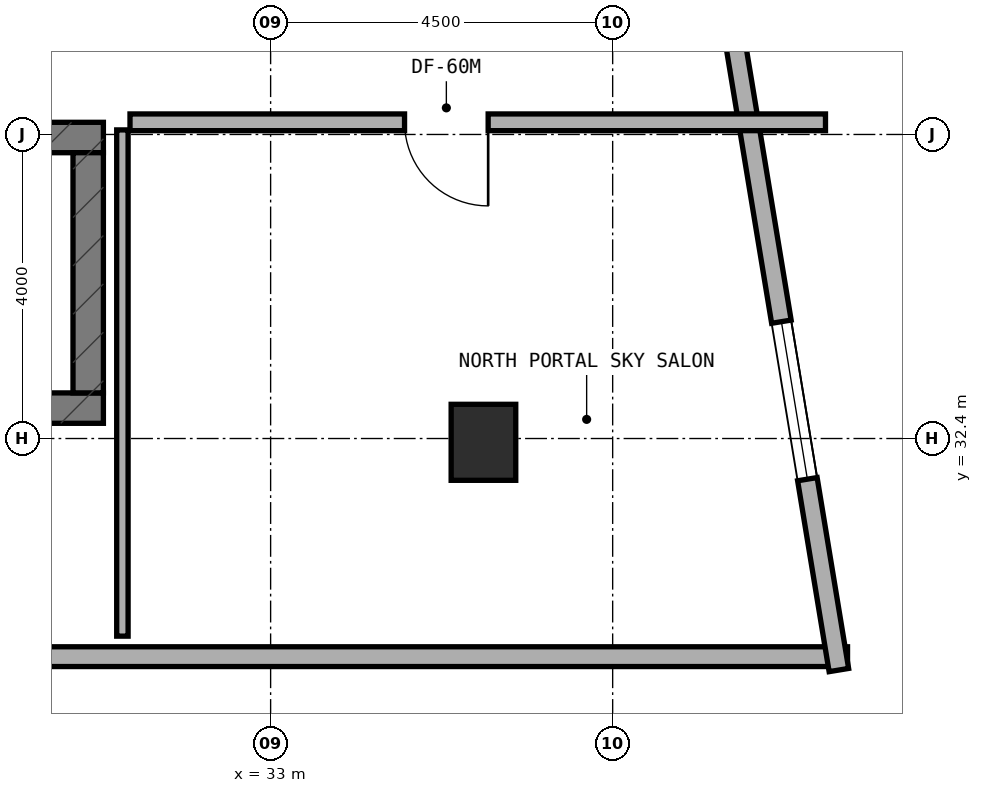
"""IFC4 building model, lengths in metres.
Left out: names, types, materials, properties, quantities, classifications, styles, units other than length and angle.
Written with IfcOpenShell. Run it as: python <this file> out.ifc"""

import sys

from ifc_helpers import new_model, si_unit, direction, frame, frame_2d, origin, origin_2d, place, context, subcontext, project, spatial, rectangle, extrude, element, fill, save


model = new_model("IFC4")
c1 = context("Model", 3, precision=1e-05, world=origin(), true_north=direction((0.0, 1.0)))
c2 = subcontext(c1, "Body", "Model", "MODEL_VIEW")
j1 = project(units=[si_unit("LENGTHUNIT", "METRE"), si_unit("PLANEANGLEUNIT", "RADIAN")], contexts=[c1])
p1 = place(None, origin())
s1 = spatial("IfcSite", under=j1, at=p1, CompositionType="ELEMENT")
p2 = place(p1, origin())
s2 = spatial("IfcBuilding", under=s1, at=p2, CompositionType="ELEMENT")
p3 = place(p2, frame((0.0, 0.0, 195.5)))
s3 = spatial("IfcBuildingStorey", under=s2, at=p3, CompositionType="ELEMENT", Elevation=195.5)
p4 = place(p3, frame((6.4, 32.8, 0.0), z_axis=(0.0, 0.0, 1.0), x_axis=(1.0, 0.0, 0.0)))
e1 = element("IfcWall", 1, at=p4, inside=s3, PredefinedType="SHEAR", context=c2, shape_type="SweptSolid", body=[
    extrude(rectangle(XDim=24.4, YDim=0.4, at=frame_2d((12.2, 0.0))), origin(), (0.0, 0.0, 1.0), 3.6),
])
p5 = place(p4, frame((6.05, 0.0, 0.0)))
e2 = element("IfcOpeningElement", 2, at=p5, cuts=e1, PredefinedType="OPENING", context=c2, shape_type="SweptSolid", body=[
    extrude(rectangle(XDim=1.1, YDim=2.15, at=frame_2d((0.55, 1.075))), frame((0.0, 0.21, 0.0), z_axis=(0.0, -1.0, 0.0), x_axis=(1.0, 0.0, 0.0)), (0.0, 0.0, 1.0), 0.42),
])
p6 = place(p3, frame((6.4, 36.36, 0.0), z_axis=(0.0, 0.0, 1.0), x_axis=(1.0, 0.0, 0.0)))
e3 = element("IfcWall", 3, at=p6, inside=s3, PredefinedType="SHEAR", context=c2, shape_type="SweptSolid", body=[
    extrude(rectangle(XDim=24.4, YDim=0.4, at=frame_2d((12.2, 0.0))), origin(), (0.0, 0.0, 1.0), 3.6),
])
p7 = place(p6, frame((9.15, 0.0, 0.0)))
e4 = element("IfcOpeningElement", 4, at=p7, cuts=e3, PredefinedType="OPENING", context=c2, shape_type="SweptSolid", body=[
    extrude(rectangle(XDim=1.2, YDim=2.15, at=frame_2d((0.6, 1.075))), frame((0.0, 0.21, 0.0), z_axis=(0.0, -1.0, 0.0), x_axis=(1.0, 0.0, 0.0)), (0.0, 0.0, 1.0), 0.42),
])
p8 = place(p6, frame((19.2, 0.0, 0.0)))
e5 = element("IfcOpeningElement", 5, at=p8, cuts=e3, PredefinedType="OPENING", context=c2, shape_type="SweptSolid", body=[
    extrude(rectangle(XDim=0.85, YDim=2.1, at=frame_2d((0.425, 1.05))), frame((0.0, 0.21, 0.0), z_axis=(0.0, -1.0, 0.0), x_axis=(1.0, 0.0, 0.0)), (0.0, 0.0, 1.0), 0.42),
])
p9 = place(p6, frame((16.94, 0.0, 0.0)))
e6 = element("IfcOpeningElement", 6, at=p9, cuts=e3, PredefinedType="OPENING", context=c2, shape_type="SweptSolid", body=[
    extrude(rectangle(XDim=0.85, YDim=2.1, at=frame_2d((0.425, 1.05))), frame((0.0, 0.21, 0.0), z_axis=(0.0, -1.0, 0.0), x_axis=(1.0, 0.0, 0.0)), (0.0, 0.0, 1.0), 0.42),
])
p10 = place(p3, frame((30.6, 33.0, 0.0), z_axis=(0.0, 0.0, 1.0), x_axis=(0.0, 1.0, 0.0)))
e7 = element("IfcWall", 7, at=p10, inside=s3, PredefinedType="SHEAR", context=c2, shape_type="SweptSolid", body=[
    extrude(rectangle(XDim=3.16, YDim=0.4, at=frame_2d((1.58, 0.0))), origin(), (0.0, 0.0, 1.0), 3.6),
])
p11 = place(p3, frame((35.8, 32.35, 0.0), z_axis=(0.0, 0.0, 1.0), x_axis=(1.0, 0.0, 0.0)))
e8 = element("IfcColumn", 8, at=p11, inside=s3, PredefinedType="COLUMN", context=c2, shape_type="SweptSolid", body=[
    extrude(rectangle(XDim=0.85, YDim=1.0, at=origin_2d()), origin(), (0.0, 0.0, 1.0), 3.6),
])
p12 = place(p3, frame((28.375, 29.53, 0.0), z_axis=(0.0, 0.0, 1.0), x_axis=(1.0, 0.0, 0.0)))
e9 = element("IfcWall", 9, at=p12, inside=s3, PredefinedType="STANDARD", context=c2, shape_type="SweptSolid", body=[
    extrude(rectangle(XDim=12.215, YDim=0.26, at=frame_2d((6.107, 0.0))), origin(), (0.0, 0.0, 1.0), 2.25),
])
p13 = place(p3, frame((40.476, 29.354, 0.0), z_axis=(0.0, 0.0, 1.0), x_axis=(-0.162811037825, 0.986657268742, 0.0)))
e10 = element("IfcWall", 10, at=p13, inside=s3, PredefinedType="STANDARD", context=c2, shape_type="SweptSolid", body=[
    extrude(rectangle(XDim=10.473, YDim=0.26, at=frame_2d((5.236, 0.0))), origin(), (0.0, 0.0, 1.0), 3.28),
])
p14 = place(p13, frame((2.545, 0.0, 0.85)))
e11 = element("IfcOpeningElement", 11, at=p14, cuts=e10, PredefinedType="OPENING", context=c2, shape_type="SweptSolid", body=[
    extrude(rectangle(XDim=2.1, YDim=1.5, at=frame_2d((1.05, 0.75))), frame((0.0, 0.14, 0.0), z_axis=(0.0, -1.0, 0.0), x_axis=(1.0, 0.0, 0.0)), (0.0, 0.0, 1.0), 0.28),
])
p15 = place(p3, frame((31.05, 29.8, 0.0), z_axis=(0.0, 0.0, 1.0), x_axis=(0.0, 1.0, 0.0)))
e12 = element("IfcWall", 12, at=p15, inside=s3, PredefinedType="PARTITIONING", context=c2, shape_type="SweptSolid", body=[
    extrude(rectangle(XDim=6.66, YDim=0.15, at=frame_2d((3.33, 0.0))), origin(), (0.0, 0.0, 1.0), 2.955),
])
p16 = place(p3, frame((31.15, 36.56, 0.0), z_axis=(0.0, 0.0, 1.0), x_axis=(1.0, 0.0, 0.0)))
e13 = element("IfcWall", 13, at=p16, inside=s3, PredefinedType="SOLIDWALL", context=c2, shape_type="SweptSolid", body=[
    extrude(rectangle(XDim=9.15, YDim=0.22, at=frame_2d((4.575, 0.0))), origin(), (0.0, 0.0, 1.0), 2.895),
])
p17 = place(p16, frame((3.612, 0.0, 0.0)))
e14 = element("IfcOpeningElement", 14, at=p17, cuts=e13, PredefinedType="OPENING", context=c2, shape_type="SweptSolid", body=[
    extrude(rectangle(XDim=1.1, YDim=2.1, at=frame_2d((0.55, 1.05))), frame((0.0, 0.12, 0.0), z_axis=(0.0, -1.0, 0.0), x_axis=(1.0, 0.0, 0.0)), (0.0, 0.0, 1.0), 0.24),
])
p18 = place(p14, origin())
e15 = element("IfcWindow", 15, at=p18, inside=s3, PartitioningType="SINGLE_PANEL", PredefinedType="WINDOW", context=c2, shape_type="SweptSolid", body=[
    extrude(rectangle(XDim=2.1, YDim=1.5, at=frame_2d((1.05, 0.75))), frame((0.0, 0.03, 0.0), z_axis=(0.0, -1.0, 0.0), x_axis=(1.0, 0.0, 0.0)), (0.0, 0.0, 1.0), 0.06),
])
fill(e11, e15)
p19 = place(p17, frame((1.1, 0.0, 0.0), z_axis=(0.0, 0.0, 1.0), x_axis=(-1.0, 0.0, 0.0)))
e16 = element("IfcDoor", 16, at=p19, inside=s3, OperationType="SINGLE_SWING_LEFT", PredefinedType="DOOR", context=c2, shape_type="SweptSolid", body=[
    extrude(rectangle(XDim=1.1, YDim=2.1, at=frame_2d((0.55, 1.05))), frame((0.0, 0.025, 0.0), z_axis=(0.0, -1.0, 0.0), x_axis=(1.0, 0.0, 0.0)), (0.0, 0.0, 1.0), 0.05),
])
fill(e14, e16)
save(model, sys.argv[1])
